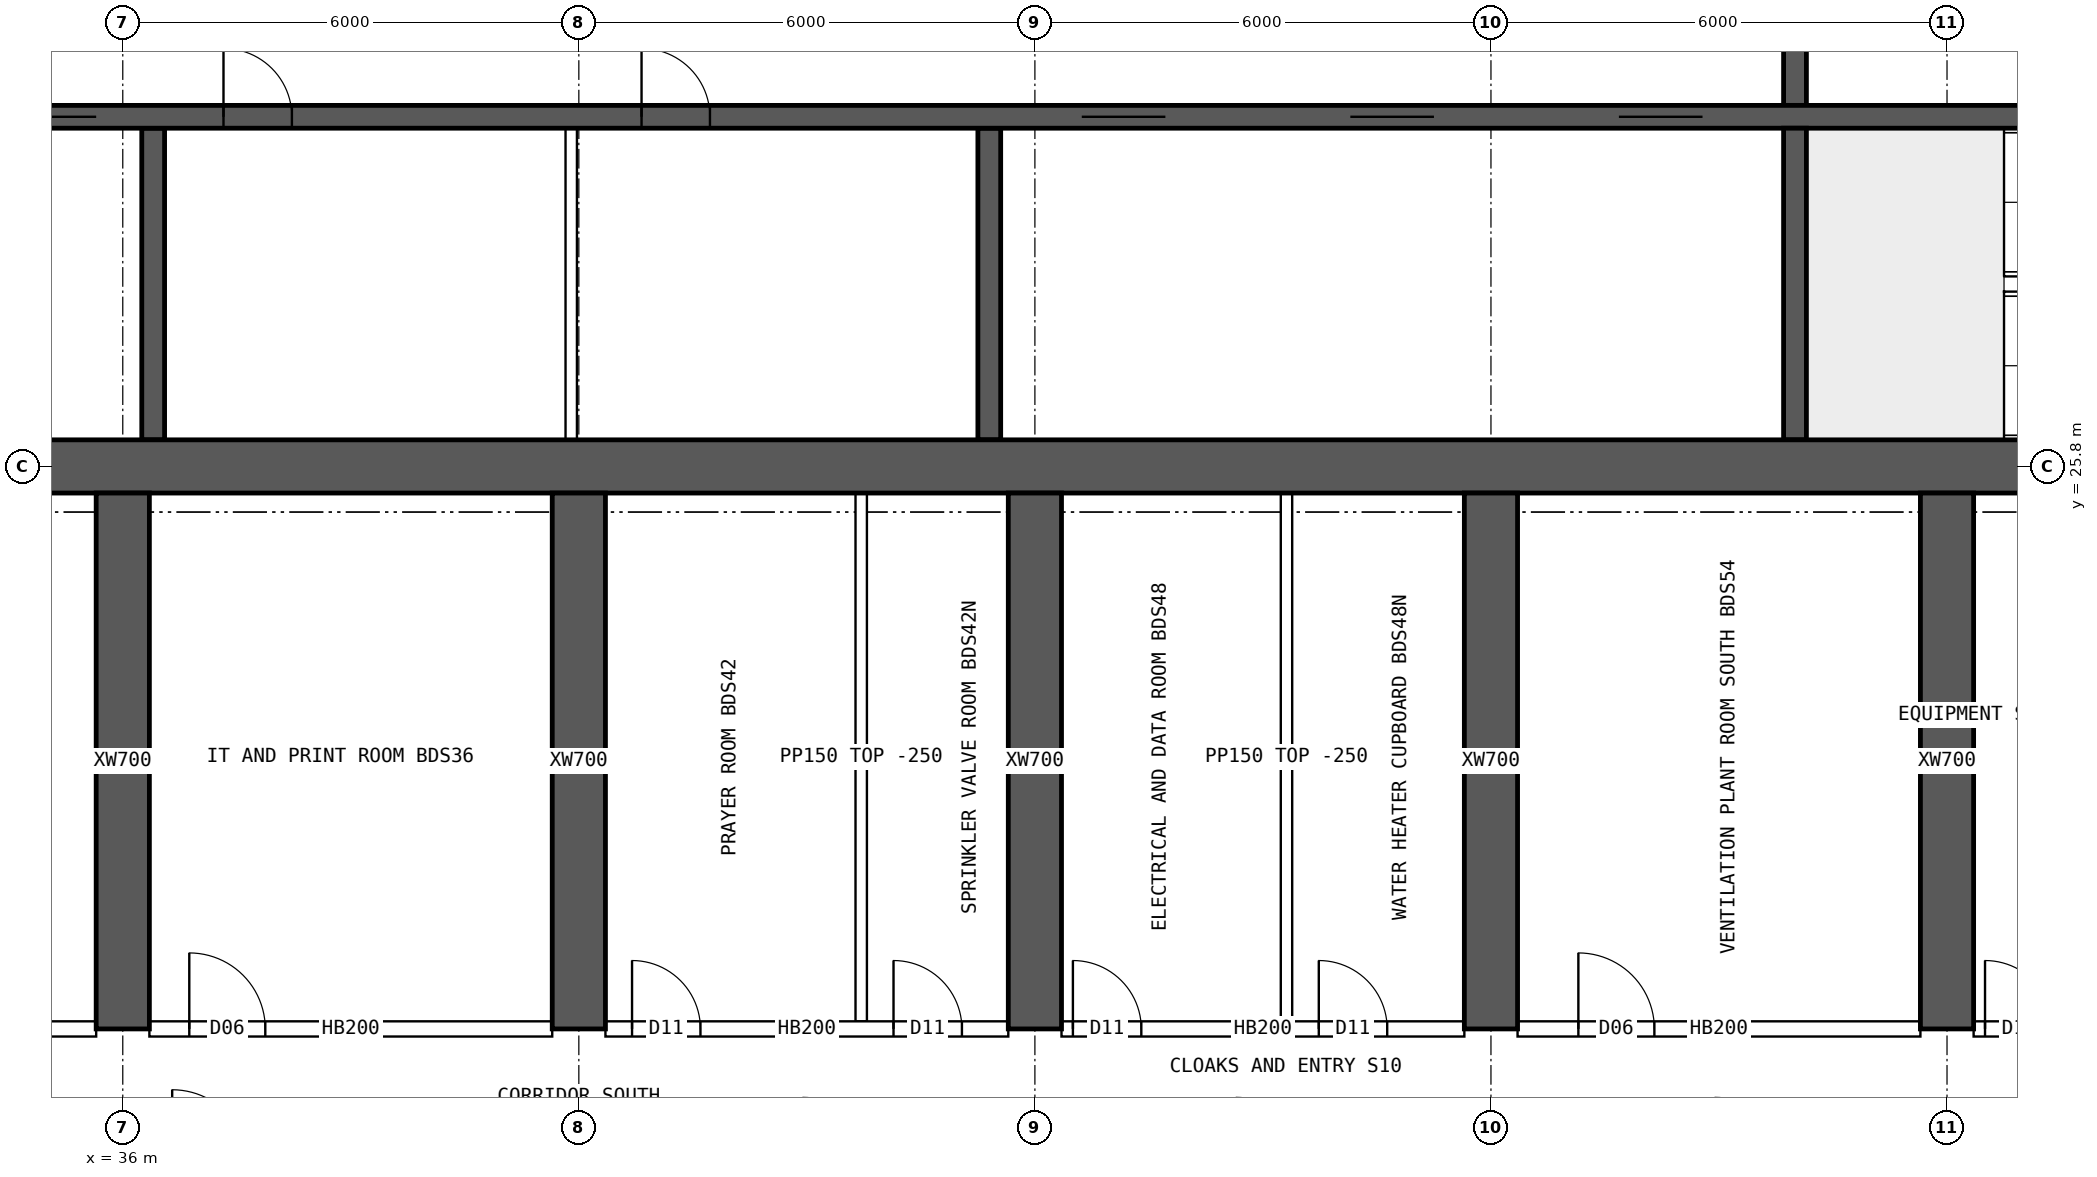
"""IFC4 building model, lengths in metres.
Left out: names, types, materials, properties, quantities, classifications, styles, units other than length and angle.
Written with IfcOpenShell. Run it as: python <this file> out.ifc"""

import sys

from ifc_helpers import new_model, si_unit, direction, frame, frame_2d, origin, place, context, subcontext, project, spatial, rectangle, extrude, element, fill, save


model = new_model("IFC4")
c1 = context("Model", 3, precision=1e-05, world=origin(), true_north=direction((0.0, 1.0)))
c2 = subcontext(c1, "Body", "Model", "MODEL_VIEW")
j1 = project(units=[si_unit("LENGTHUNIT", "METRE"), si_unit("PLANEANGLEUNIT", "RADIAN")], contexts=[c1])
p1 = place(None, origin())
s1 = spatial("IfcSite", under=j1, at=p1, CompositionType="ELEMENT")
p2 = place(p1, origin())
s2 = spatial("IfcBuilding", under=s1, at=p2, CompositionType="ELEMENT")
p3 = place(p2, frame((0.0, 0.0, 231.55)))
s3 = spatial("IfcBuildingStorey", under=s2, at=p3, CompositionType="ELEMENT", Elevation=231.55)
p4 = place(p3, frame((18.0, 25.8, 0.0), z_axis=(0.0, 0.0, 1.0), x_axis=(1.0, 0.0, 0.0)))
e1 = element("IfcWall", 1, at=p4, inside=s3, PredefinedType="SHEAR", context=c2, shape_type="SweptSolid", body=[
    extrude(rectangle(XDim=48.0, YDim=0.7, at=frame_2d((24.0, 0.0))), origin(), (0.0, 0.0, 1.0), 3.75),
])
p5 = place(p3, frame((18.35, 30.4, 0.0), z_axis=(0.0, 0.0, 1.0), x_axis=(1.0, 0.0, 0.0)))
e2 = element("IfcWall", 2, at=p5, inside=s3, PredefinedType="SHEAR", context=c2, shape_type="SweptSolid", body=[
    extrude(rectangle(XDim=47.3, YDim=0.3, at=frame_2d((23.65, 0.0))), origin(), (0.0, 0.0, 1.0), 3.75),
])
p6 = place(p5, frame((0.4, 0.0, 0.0)))
e3 = element("IfcOpeningElement", 3, at=p6, cuts=e2, PredefinedType="OPENING", context=c2, shape_type="SweptSolid", body=[
    extrude(rectangle(XDim=1.0, YDim=2.1, at=frame_2d((0.5, 1.05))), frame((0.0, 0.16, 0.0), z_axis=(0.0, -1.0, 0.0), x_axis=(1.0, 0.0, 0.0)), (0.0, 0.0, 1.0), 0.32),
])
p7 = place(p5, frame((45.9, 0.0, 0.0)))
e4 = element("IfcOpeningElement", 4, at=p7, cuts=e2, PredefinedType="OPENING", context=c2, shape_type="SweptSolid", body=[
    extrude(rectangle(XDim=1.0, YDim=2.1, at=frame_2d((0.5, 1.05))), frame((0.0, 0.16, 0.0), z_axis=(0.0, -1.0, 0.0), x_axis=(1.0, 0.0, 0.0)), (0.0, 0.0, 1.0), 0.32),
])
p8 = place(p5, frame((8.4, 0.0, 0.0)))
e5 = element("IfcOpeningElement", 5, at=p8, cuts=e2, PredefinedType="OPENING", context=c2, shape_type="SweptSolid", body=[
    extrude(rectangle(XDim=1.1, YDim=2.1, at=frame_2d((0.55, 1.05))), frame((0.0, 0.16, 0.0), z_axis=(0.0, -1.0, 0.0), x_axis=(1.0, 0.0, 0.0)), (0.0, 0.0, 1.0), 0.32),
])
p9 = place(p5, frame((11.0, 0.0, 0.0)))
e6 = element("IfcOpeningElement", 6, at=p9, cuts=e2, PredefinedType="OPENING", context=c2, shape_type="SweptSolid", body=[
    extrude(rectangle(XDim=1.1, YDim=2.1, at=frame_2d((0.55, 1.05))), frame((0.0, 0.16, 0.0), z_axis=(0.0, -1.0, 0.0), x_axis=(1.0, 0.0, 0.0)), (0.0, 0.0, 1.0), 0.32),
])
p10 = place(p5, frame((13.6, 0.0, 0.0)))
e7 = element("IfcOpeningElement", 7, at=p10, cuts=e2, PredefinedType="OPENING", context=c2, shape_type="SweptSolid", body=[
    extrude(rectangle(XDim=1.1, YDim=2.1, at=frame_2d((0.55, 1.05))), frame((0.0, 0.16, 0.0), z_axis=(0.0, -1.0, 0.0), x_axis=(1.0, 0.0, 0.0)), (0.0, 0.0, 1.0), 0.32),
])
p11 = place(p5, frame((16.2, 0.0, 0.0)))
e8 = element("IfcOpeningElement", 8, at=p11, cuts=e2, PredefinedType="OPENING", context=c2, shape_type="SweptSolid", body=[
    extrude(rectangle(XDim=1.1, YDim=2.1, at=frame_2d((0.55, 1.05))), frame((0.0, 0.16, 0.0), z_axis=(0.0, -1.0, 0.0), x_axis=(1.0, 0.0, 0.0)), (0.0, 0.0, 1.0), 0.32),
])
p12 = place(p5, frame((18.975, 0.0, 0.0)))
e9 = element("IfcOpeningElement", 9, at=p12, cuts=e2, PredefinedType="OPENING", context=c2, shape_type="SweptSolid", body=[
    extrude(rectangle(XDim=0.9, YDim=2.1, at=frame_2d((0.45, 1.05))), frame((0.0, 0.16, 0.0), z_axis=(0.0, -1.0, 0.0), x_axis=(1.0, 0.0, 0.0)), (0.0, 0.0, 1.0), 0.32),
])
p13 = place(p5, frame((24.475, 0.0, 0.0)))
e10 = element("IfcOpeningElement", 10, at=p13, cuts=e2, PredefinedType="OPENING", context=c2, shape_type="SweptSolid", body=[
    extrude(rectangle(XDim=0.9, YDim=2.1, at=frame_2d((0.45, 1.05))), frame((0.0, 0.16, 0.0), z_axis=(0.0, -1.0, 0.0), x_axis=(1.0, 0.0, 0.0)), (0.0, 0.0, 1.0), 0.32),
])
p14 = place(p5, frame((30.267, 0.0, 0.0)))
e11 = element("IfcOpeningElement", 11, at=p14, cuts=e2, PredefinedType="OPENING", context=c2, shape_type="SweptSolid", body=[
    extrude(rectangle(XDim=1.1, YDim=2.1, at=frame_2d((0.55, 1.05))), frame((0.0, 0.16, 0.0), z_axis=(0.0, -1.0, 0.0), x_axis=(1.0, 0.0, 0.0)), (0.0, 0.0, 1.0), 0.32),
])
p15 = place(p5, frame((33.8, 0.0, 0.0)))
e12 = element("IfcOpeningElement", 12, at=p15, cuts=e2, PredefinedType="OPENING", context=c2, shape_type="SweptSolid", body=[
    extrude(rectangle(XDim=1.1, YDim=2.1, at=frame_2d((0.55, 1.05))), frame((0.0, 0.16, 0.0), z_axis=(0.0, -1.0, 0.0), x_axis=(1.0, 0.0, 0.0)), (0.0, 0.0, 1.0), 0.32),
])
p16 = place(p5, frame((37.333, 0.0, 0.0)))
e13 = element("IfcOpeningElement", 13, at=p16, cuts=e2, PredefinedType="OPENING", context=c2, shape_type="SweptSolid", body=[
    extrude(rectangle(XDim=1.1, YDim=2.1, at=frame_2d((0.55, 1.05))), frame((0.0, 0.16, 0.0), z_axis=(0.0, -1.0, 0.0), x_axis=(1.0, 0.0, 0.0)), (0.0, 0.0, 1.0), 0.32),
])
p17 = place(p3, frame((58.0, 26.15, 0.0), z_axis=(0.0, 0.0, 1.0), x_axis=(0.0, 1.0, 0.0)))
e14 = element("IfcWall", 14, at=p17, inside=s3, PredefinedType="SHEAR", context=c2, shape_type="SweptSolid", body=[
    extrude(rectangle(XDim=4.1, YDim=0.3, at=frame_2d((2.05, 0.0))), origin(), (0.0, 0.0, 1.0), 3.75),
])
p18 = place(p3, frame((58.0, 30.55, 0.0), z_axis=(0.0, 0.0, 1.0), x_axis=(0.0, 1.0, 0.0)))
e15 = element("IfcWall", 15, at=p18, inside=s3, PredefinedType="SHEAR", context=c2, shape_type="SweptSolid", body=[
    extrude(rectangle(XDim=3.9, YDim=0.3, at=frame_2d((1.95, 0.0))), origin(), (0.0, 0.0, 1.0), 3.75),
])
p19 = place(p18, frame((1.4, 0.0, 0.0)))
e16 = element("IfcOpeningElement", 16, at=p19, cuts=e15, PredefinedType="OPENING", context=c2, shape_type="SweptSolid", body=[
    extrude(rectangle(XDim=1.2, YDim=2.1, at=frame_2d((0.6, 1.05))), frame((0.0, 0.16, 0.0), z_axis=(0.0, -1.0, 0.0), x_axis=(1.0, 0.0, 0.0)), (0.0, 0.0, 1.0), 0.32),
])
for number, where, z_axis, x_axis in (
    (17, (36.4, 26.15, 0.0), (0.0, 0.0, 1.0), (0.0, 1.0, 0.0)),
    (18, (47.4, 26.15, 0.0), (0.0, 0.0, 1.0), (0.0, 1.0, 0.0)),
):
    element("IfcWall", number, at=place(p3, frame(where, z_axis=z_axis, x_axis=x_axis)), inside=s3, PredefinedType="SHEAR", context=c2, shape_type="SweptSolid", body=[
        extrude(rectangle(XDim=4.1, YDim=0.3, at=frame_2d((2.05, 0.0))), origin(), (0.0, 0.0, 1.0), 3.75),
    ])
for number, where, z_axis, x_axis in (
    (19, (36.0, 18.4, 0.0), (0.0, 0.0, 1.0), (0.0, 1.0, 0.0)),
    (20, (42.0, 18.4, 0.0), (0.0, 0.0, 1.0), (0.0, 1.0, 0.0)),
    (21, (48.0, 18.4, 0.0), (0.0, 0.0, 1.0), (0.0, 1.0, 0.0)),
    (22, (54.0, 18.4, 0.0), (0.0, 0.0, 1.0), (0.0, 1.0, 0.0)),
    (23, (60.0, 18.4, 0.0), (0.0, 0.0, 1.0), (0.0, 1.0, 0.0)),
):
    element("IfcWall", number, at=place(p3, frame(where, z_axis=z_axis, x_axis=x_axis)), inside=s3, PredefinedType="SHEAR", context=c2, shape_type="SweptSolid", body=[
        extrude(rectangle(XDim=7.05, YDim=0.7, at=frame_2d((3.525, 0.0))), origin(), (0.0, 0.0, 1.0), 3.75),
    ])
p20 = place(p3, frame((41.9, 26.15, 0.0), z_axis=(0.0, 0.0, 1.0), x_axis=(0.0, 1.0, 0.0)))
e24 = element("IfcWall", 24, at=p20, inside=s3, PredefinedType="SOLIDWALL", context=c2, shape_type="SweptSolid", body=[
    extrude(rectangle(XDim=4.1, YDim=0.15, at=frame_2d((2.05, 0.0))), origin(), (0.0, 0.0, 1.0), 3.5),
])
p21 = place(p3, frame((30.35, 18.4, 0.0), z_axis=(0.0, 0.0, 1.0), x_axis=(1.0, 0.0, 0.0)))
e25 = element("IfcWall", 25, at=p21, inside=s3, PredefinedType="SOLIDWALL", context=c2, shape_type="SweptSolid", body=[
    extrude(rectangle(XDim=5.3, YDim=0.2, at=frame_2d((2.65, 0.0))), origin(), (0.0, 0.0, 1.0), 3.5),
])
p22 = place(p21, frame((0.8, 0.0, 0.0)))
e26 = element("IfcOpeningElement", 26, at=p22, cuts=e25, PredefinedType="OPENING", context=c2, shape_type="SweptSolid", body=[
    extrude(rectangle(XDim=1.0, YDim=2.1, at=frame_2d((0.5, 1.05))), frame((0.0, 0.11, 0.0), z_axis=(0.0, -1.0, 0.0), x_axis=(1.0, 0.0, 0.0)), (0.0, 0.0, 1.0), 0.22),
])
p23 = place(p3, frame((36.35, 18.4, 0.0), z_axis=(0.0, 0.0, 1.0), x_axis=(1.0, 0.0, 0.0)))
e27 = element("IfcWall", 27, at=p23, inside=s3, PredefinedType="SOLIDWALL", context=c2, shape_type="SweptSolid", body=[
    extrude(rectangle(XDim=5.3, YDim=0.2, at=frame_2d((2.65, 0.0))), origin(), (0.0, 0.0, 1.0), 3.5),
])
p24 = place(p23, frame((0.525, 0.0, 0.0)))
e28 = element("IfcOpeningElement", 28, at=p24, cuts=e27, PredefinedType="OPENING", context=c2, shape_type="SweptSolid", body=[
    extrude(rectangle(XDim=1.0, YDim=2.1, at=frame_2d((0.5, 1.05))), frame((0.0, 0.11, 0.0), z_axis=(0.0, -1.0, 0.0), x_axis=(1.0, 0.0, 0.0)), (0.0, 0.0, 1.0), 0.22),
])
p25 = place(p3, frame((42.35, 18.4, 0.0), z_axis=(0.0, 0.0, 1.0), x_axis=(1.0, 0.0, 0.0)))
e29 = element("IfcWall", 29, at=p25, inside=s3, PredefinedType="SOLIDWALL", context=c2, shape_type="SweptSolid", body=[
    extrude(rectangle(XDim=5.3, YDim=0.2, at=frame_2d((2.65, 0.0))), origin(), (0.0, 0.0, 1.0), 3.5),
])
p26 = place(p25, frame((0.35, 0.0, 0.0)))
e30 = element("IfcOpeningElement", 30, at=p26, cuts=e29, PredefinedType="OPENING", context=c2, shape_type="SweptSolid", body=[
    extrude(rectangle(XDim=0.9, YDim=2.1, at=frame_2d((0.45, 1.05))), frame((0.0, 0.11, 0.0), z_axis=(0.0, -1.0, 0.0), x_axis=(1.0, 0.0, 0.0)), (0.0, 0.0, 1.0), 0.22),
])
p27 = place(p25, frame((3.79, 0.0, 0.0)))
e31 = element("IfcOpeningElement", 31, at=p27, cuts=e29, PredefinedType="OPENING", context=c2, shape_type="SweptSolid", body=[
    extrude(rectangle(XDim=0.9, YDim=2.1, at=frame_2d((0.45, 1.05))), frame((0.0, 0.11, 0.0), z_axis=(0.0, -1.0, 0.0), x_axis=(1.0, 0.0, 0.0)), (0.0, 0.0, 1.0), 0.22),
])
p28 = place(p3, frame((48.35, 18.4, 0.0), z_axis=(0.0, 0.0, 1.0), x_axis=(1.0, 0.0, 0.0)))
e32 = element("IfcWall", 32, at=p28, inside=s3, PredefinedType="SOLIDWALL", context=c2, shape_type="SweptSolid", body=[
    extrude(rectangle(XDim=5.3, YDim=0.2, at=frame_2d((2.65, 0.0))), origin(), (0.0, 0.0, 1.0), 3.5),
])
p29 = place(p28, frame((0.15, 0.0, 0.0)))
e33 = element("IfcOpeningElement", 33, at=p29, cuts=e32, PredefinedType="OPENING", context=c2, shape_type="SweptSolid", body=[
    extrude(rectangle(XDim=0.9, YDim=2.1, at=frame_2d((0.45, 1.05))), frame((0.0, 0.11, 0.0), z_axis=(0.0, -1.0, 0.0), x_axis=(1.0, 0.0, 0.0)), (0.0, 0.0, 1.0), 0.22),
])
p30 = place(p28, frame((3.385, 0.0, 0.0)))
e34 = element("IfcOpeningElement", 34, at=p30, cuts=e32, PredefinedType="OPENING", context=c2, shape_type="SweptSolid", body=[
    extrude(rectangle(XDim=0.9, YDim=2.1, at=frame_2d((0.45, 1.05))), frame((0.0, 0.11, 0.0), z_axis=(0.0, -1.0, 0.0), x_axis=(1.0, 0.0, 0.0)), (0.0, 0.0, 1.0), 0.22),
])
p31 = place(p3, frame((54.35, 18.4, 0.0), z_axis=(0.0, 0.0, 1.0), x_axis=(1.0, 0.0, 0.0)))
e35 = element("IfcWall", 35, at=p31, inside=s3, PredefinedType="SOLIDWALL", context=c2, shape_type="SweptSolid", body=[
    extrude(rectangle(XDim=5.3, YDim=0.2, at=frame_2d((2.65, 0.0))), origin(), (0.0, 0.0, 1.0), 3.5),
])
p32 = place(p31, frame((0.8, 0.0, 0.0)))
e36 = element("IfcOpeningElement", 36, at=p32, cuts=e35, PredefinedType="OPENING", context=c2, shape_type="SweptSolid", body=[
    extrude(rectangle(XDim=1.0, YDim=2.1, at=frame_2d((0.5, 1.05))), frame((0.0, 0.11, 0.0), z_axis=(0.0, -1.0, 0.0), x_axis=(1.0, 0.0, 0.0)), (0.0, 0.0, 1.0), 0.22),
])
p33 = place(p3, frame((60.35, 18.4, 0.0), z_axis=(0.0, 0.0, 1.0), x_axis=(1.0, 0.0, 0.0)))
e37 = element("IfcWall", 37, at=p33, inside=s3, PredefinedType="SOLIDWALL", context=c2, shape_type="SweptSolid", body=[
    extrude(rectangle(XDim=5.3, YDim=0.2, at=frame_2d((2.65, 0.0))), origin(), (0.0, 0.0, 1.0), 3.5),
])
p34 = place(p33, frame((0.15, 0.0, 0.0)))
e38 = element("IfcOpeningElement", 38, at=p34, cuts=e37, PredefinedType="OPENING", context=c2, shape_type="SweptSolid", body=[
    extrude(rectangle(XDim=0.9, YDim=2.1, at=frame_2d((0.45, 1.05))), frame((0.0, 0.11, 0.0), z_axis=(0.0, -1.0, 0.0), x_axis=(1.0, 0.0, 0.0)), (0.0, 0.0, 1.0), 0.22),
])
p35 = place(p33, frame((2.15, 0.0, 0.0)))
e39 = element("IfcOpeningElement", 39, at=p35, cuts=e37, PredefinedType="OPENING", context=c2, shape_type="SweptSolid", body=[
    extrude(rectangle(XDim=0.9, YDim=2.1, at=frame_2d((0.45, 1.05))), frame((0.0, 0.11, 0.0), z_axis=(0.0, -1.0, 0.0), x_axis=(1.0, 0.0, 0.0)), (0.0, 0.0, 1.0), 0.22),
])
for number, where, z_axis, x_axis in (
    (40, (45.715, 18.5, 0.0), (0.0, 0.0, 1.0), (0.0, 1.0, 0.0)),
    (41, (51.31, 18.5, 0.0), (0.0, 0.0, 1.0), (0.0, 1.0, 0.0)),
):
    element("IfcWall", number, at=place(p3, frame(where, z_axis=z_axis, x_axis=x_axis)), inside=s3, PredefinedType="PARTITIONING", context=c2, shape_type="SweptSolid", body=[
        extrude(rectangle(XDim=6.95, YDim=0.15, at=frame_2d((3.475, 0.0))), origin(), (0.0, 0.0, 1.0), 3.5),
    ])
p36 = place(p11, origin())
e42 = element("IfcDoor", 42, at=p36, inside=s3, OperationType="DOUBLE_DOOR_SLIDING", PredefinedType="DOOR", context=c2, shape_type="SweptSolid", body=[
    extrude(rectangle(XDim=1.1, YDim=2.1, at=frame_2d((0.55, 1.05))), frame((0.0, 0.025, 0.0), z_axis=(0.0, -1.0, 0.0), x_axis=(1.0, 0.0, 0.0)), (0.0, 0.0, 1.0), 0.05),
])
fill(e8, e42)
p37 = place(p12, origin())
e43 = element("IfcDoor", 43, at=p37, inside=s3, OperationType="SINGLE_SWING_LEFT", PredefinedType="DOOR", context=c2, shape_type="SweptSolid", body=[
    extrude(rectangle(XDim=0.9, YDim=2.1, at=frame_2d((0.45, 1.05))), frame((0.0, 0.025, 0.0), z_axis=(0.0, -1.0, 0.0), x_axis=(1.0, 0.0, 0.0)), (0.0, 0.0, 1.0), 0.05),
])
fill(e9, e43)
p38 = place(p13, origin())
e44 = element("IfcDoor", 44, at=p38, inside=s3, OperationType="SINGLE_SWING_LEFT", PredefinedType="DOOR", context=c2, shape_type="SweptSolid", body=[
    extrude(rectangle(XDim=0.9, YDim=2.1, at=frame_2d((0.45, 1.05))), frame((0.0, 0.025, 0.0), z_axis=(0.0, -1.0, 0.0), x_axis=(1.0, 0.0, 0.0)), (0.0, 0.0, 1.0), 0.05),
])
fill(e10, e44)
p39 = place(p14, origin())
e45 = element("IfcDoor", 45, at=p39, inside=s3, OperationType="DOUBLE_DOOR_SLIDING", PredefinedType="DOOR", context=c2, shape_type="SweptSolid", body=[
    extrude(rectangle(XDim=1.1, YDim=2.1, at=frame_2d((0.55, 1.05))), frame((0.0, 0.025, 0.0), z_axis=(0.0, -1.0, 0.0), x_axis=(1.0, 0.0, 0.0)), (0.0, 0.0, 1.0), 0.05),
])
fill(e11, e45)
p40 = place(p15, origin())
e46 = element("IfcDoor", 46, at=p40, inside=s3, OperationType="DOUBLE_DOOR_SLIDING", PredefinedType="DOOR", context=c2, shape_type="SweptSolid", body=[
    extrude(rectangle(XDim=1.1, YDim=2.1, at=frame_2d((0.55, 1.05))), frame((0.0, 0.025, 0.0), z_axis=(0.0, -1.0, 0.0), x_axis=(1.0, 0.0, 0.0)), (0.0, 0.0, 1.0), 0.05),
])
fill(e12, e46)
p41 = place(p16, origin())
e47 = element("IfcDoor", 47, at=p41, inside=s3, OperationType="DOUBLE_DOOR_SLIDING", PredefinedType="DOOR", context=c2, shape_type="SweptSolid", body=[
    extrude(rectangle(XDim=1.1, YDim=2.1, at=frame_2d((0.55, 1.05))), frame((0.0, 0.025, 0.0), z_axis=(0.0, -1.0, 0.0), x_axis=(1.0, 0.0, 0.0)), (0.0, 0.0, 1.0), 0.05),
])
fill(e13, e47)
p42 = place(p24, origin())
e48 = element("IfcDoor", 48, at=p42, inside=s3, OperationType="SINGLE_SWING_LEFT", PredefinedType="DOOR", context=c2, shape_type="SweptSolid", body=[
    extrude(rectangle(XDim=1.0, YDim=2.1, at=frame_2d((0.5, 1.05))), frame((0.0, 0.025, 0.0), z_axis=(0.0, -1.0, 0.0), x_axis=(1.0, 0.0, 0.0)), (0.0, 0.0, 1.0), 0.05),
])
fill(e28, e48)
p43 = place(p26, origin())
e49 = element("IfcDoor", 49, at=p43, inside=s3, OperationType="SINGLE_SWING_LEFT", PredefinedType="DOOR", context=c2, shape_type="SweptSolid", body=[
    extrude(rectangle(XDim=0.9, YDim=2.1, at=frame_2d((0.45, 1.05))), frame((0.0, 0.025, 0.0), z_axis=(0.0, -1.0, 0.0), x_axis=(1.0, 0.0, 0.0)), (0.0, 0.0, 1.0), 0.05),
])
fill(e30, e49)
p44 = place(p27, origin())
e50 = element("IfcDoor", 50, at=p44, inside=s3, OperationType="SINGLE_SWING_LEFT", PredefinedType="DOOR", context=c2, shape_type="SweptSolid", body=[
    extrude(rectangle(XDim=0.9, YDim=2.1, at=frame_2d((0.45, 1.05))), frame((0.0, 0.025, 0.0), z_axis=(0.0, -1.0, 0.0), x_axis=(1.0, 0.0, 0.0)), (0.0, 0.0, 1.0), 0.05),
])
fill(e31, e50)
p45 = place(p29, origin())
e51 = element("IfcDoor", 51, at=p45, inside=s3, OperationType="SINGLE_SWING_LEFT", PredefinedType="DOOR", context=c2, shape_type="SweptSolid", body=[
    extrude(rectangle(XDim=0.9, YDim=2.1, at=frame_2d((0.45, 1.05))), frame((0.0, 0.025, 0.0), z_axis=(0.0, -1.0, 0.0), x_axis=(1.0, 0.0, 0.0)), (0.0, 0.0, 1.0), 0.05),
])
fill(e33, e51)
p46 = place(p30, origin())
e52 = element("IfcDoor", 52, at=p46, inside=s3, OperationType="SINGLE_SWING_LEFT", PredefinedType="DOOR", context=c2, shape_type="SweptSolid", body=[
    extrude(rectangle(XDim=0.9, YDim=2.1, at=frame_2d((0.45, 1.05))), frame((0.0, 0.025, 0.0), z_axis=(0.0, -1.0, 0.0), x_axis=(1.0, 0.0, 0.0)), (0.0, 0.0, 1.0), 0.05),
])
fill(e34, e52)
p47 = place(p32, origin())
e53 = element("IfcDoor", 53, at=p47, inside=s3, OperationType="SINGLE_SWING_LEFT", PredefinedType="DOOR", context=c2, shape_type="SweptSolid", body=[
    extrude(rectangle(XDim=1.0, YDim=2.1, at=frame_2d((0.5, 1.05))), frame((0.0, 0.025, 0.0), z_axis=(0.0, -1.0, 0.0), x_axis=(1.0, 0.0, 0.0)), (0.0, 0.0, 1.0), 0.05),
])
fill(e36, e53)
p48 = place(p34, origin())
e54 = element("IfcDoor", 54, at=p48, inside=s3, OperationType="SINGLE_SWING_LEFT", PredefinedType="DOOR", context=c2, shape_type="SweptSolid", body=[
    extrude(rectangle(XDim=0.9, YDim=2.1, at=frame_2d((0.45, 1.05))), frame((0.0, 0.025, 0.0), z_axis=(0.0, -1.0, 0.0), x_axis=(1.0, 0.0, 0.0)), (0.0, 0.0, 1.0), 0.05),
])
fill(e38, e54)
save(model, sys.argv[1])
